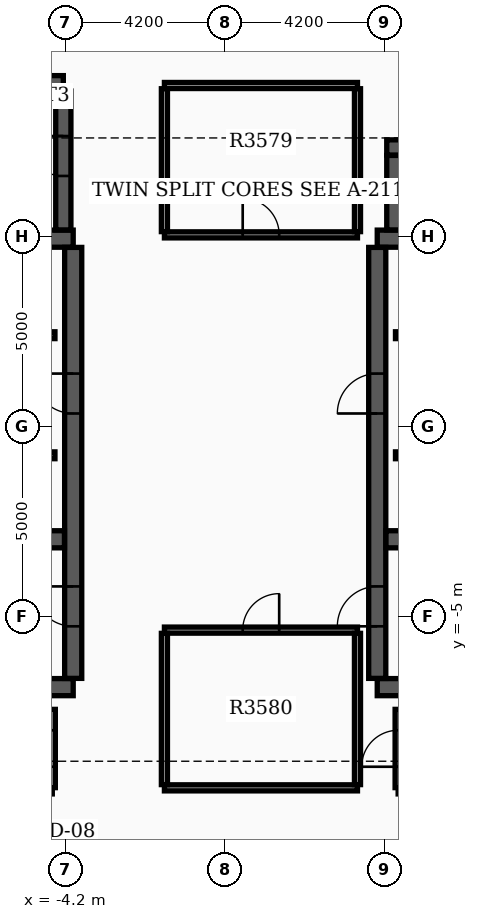
"""IFC4 building model, lengths in metres.
Left out: names, types, materials, properties, quantities, classifications, styles, units other than length and angle.
Written with IfcOpenShell. Run it as: python <this file> out.ifc"""

import sys

from ifc_helpers import new_model, si_unit, direction, frame, frame_2d, origin, place, context, subcontext, project, spatial, rectangle, extrude, element, fill, save


model = new_model("IFC4")
c1 = context("Model", 3, precision=1e-05, world=origin(), true_north=direction((0.0, 1.0)))
c2 = subcontext(c1, "Body", "Model", "MODEL_VIEW")
j1 = project(units=[si_unit("LENGTHUNIT", "METRE"), si_unit("PLANEANGLEUNIT", "RADIAN")], contexts=[c1])
p1 = place(None, origin())
s1 = spatial("IfcSite", under=j1, at=p1, CompositionType="ELEMENT")
p2 = place(p1, origin())
s2 = spatial("IfcBuilding", under=s1, at=p2, CompositionType="ELEMENT")
p3 = place(p2, frame((0.0, 0.0, 224.7)))
s3 = spatial("IfcBuildingStorey", under=s2, at=p3, CompositionType="ELEMENT", Elevation=224.7)
for number, where, z_axis, x_axis in (
    (1, (-12.4, -6.85, 0.0), (0.0, 0.0, 1.0), (1.0, 0.0, 0.0)),
    (2, (-12.4, 4.95, 0.0), (0.0, 0.0, 1.0), (1.0, 0.0, 0.0)),
):
    element("IfcWall", number, at=place(p3, frame(where, z_axis=z_axis, x_axis=x_axis)), inside=s3, PredefinedType="SHEAR", context=c2, shape_type="SweptSolid", body=[
        extrude(rectangle(XDim=8.4, YDim=0.45, at=frame_2d((4.2, 0.0))), origin(), (0.0, 0.0, 1.0), 3.7),
    ])
p4 = place(p3, frame((-4.0, -6.62, 0.0), z_axis=(0.0, 0.0, 1.0), x_axis=(0.0, 1.0, 0.0)))
e3 = element("IfcWall", 3, at=p4, inside=s3, PredefinedType="SHEAR", context=c2, shape_type="SweptSolid", body=[
    extrude(rectangle(XDim=11.34, YDim=0.45, at=frame_2d((5.67, 0.0))), origin(), (0.0, 0.0, 1.0), 3.7),
])
p5 = place(p4, frame((1.37, 0.0, 0.0)))
e4 = element("IfcOpeningElement", 4, at=p5, cuts=e3, PredefinedType="OPENING", context=c2, shape_type="SweptSolid", body=[
    extrude(rectangle(XDim=1.05, YDim=2.15, at=frame_2d((0.525, 1.075))), frame((0.0, 0.235, 0.0), z_axis=(0.0, -1.0, 0.0), x_axis=(1.0, 0.0, 0.0)), (0.0, 0.0, 1.0), 0.47),
])
p6 = place(p4, frame((6.97, 0.0, 0.0)))
e5 = element("IfcOpeningElement", 5, at=p6, cuts=e3, PredefinedType="OPENING", context=c2, shape_type="SweptSolid", body=[
    extrude(rectangle(XDim=1.05, YDim=2.15, at=frame_2d((0.525, 1.075))), frame((0.0, 0.235, 0.0), z_axis=(0.0, -1.0, 0.0), x_axis=(1.0, 0.0, 0.0)), (0.0, 0.0, 1.0), 0.47),
])
p7 = place(p3, frame((-12.17, -2.96, 0.0), z_axis=(0.0, 0.0, 1.0), x_axis=(1.0, 0.0, 0.0)))
e6 = element("IfcWall", 6, at=p7, inside=s3, PredefinedType="SHEAR", context=c2, shape_type="SweptSolid", body=[
    extrude(rectangle(XDim=7.94, YDim=0.45, at=frame_2d((3.97, 0.0))), origin(), (0.0, 0.0, 1.0), 3.7),
])
for number, where, z_axis, x_axis in (
    (7, (4.0, -6.85, 0.0), (0.0, 0.0, 1.0), (1.0, 0.0, 0.0)),
    (8, (4.0, 4.95, 0.0), (0.0, 0.0, 1.0), (1.0, 0.0, 0.0)),
):
    element("IfcWall", number, at=place(p3, frame(where, z_axis=z_axis, x_axis=x_axis)), inside=s3, PredefinedType="SHEAR", context=c2, shape_type="SweptSolid", body=[
        extrude(rectangle(XDim=8.4, YDim=0.45, at=frame_2d((4.2, 0.0))), origin(), (0.0, 0.0, 1.0), 3.7),
    ])
p8 = place(p3, frame((4.0, -6.62, 0.0), z_axis=(0.0, 0.0, 1.0), x_axis=(0.0, 1.0, 0.0)))
e9 = element("IfcWall", 9, at=p8, inside=s3, PredefinedType="SHEAR", context=c2, shape_type="SweptSolid", body=[
    extrude(rectangle(XDim=11.34, YDim=0.45, at=frame_2d((5.67, 0.0))), origin(), (0.0, 0.0, 1.0), 3.7),
])
p9 = place(p8, frame((1.37, 0.0, 0.0)))
e10 = element("IfcOpeningElement", 10, at=p9, cuts=e9, PredefinedType="OPENING", context=c2, shape_type="SweptSolid", body=[
    extrude(rectangle(XDim=1.05, YDim=2.15, at=frame_2d((0.525, 1.075))), frame((0.0, 0.235, 0.0), z_axis=(0.0, -1.0, 0.0), x_axis=(1.0, 0.0, 0.0)), (0.0, 0.0, 1.0), 0.47),
])
p10 = place(p8, frame((6.97, 0.0, 0.0)))
e11 = element("IfcOpeningElement", 11, at=p10, cuts=e9, PredefinedType="OPENING", context=c2, shape_type="SweptSolid", body=[
    extrude(rectangle(XDim=1.05, YDim=2.15, at=frame_2d((0.525, 1.075))), frame((0.0, 0.235, 0.0), z_axis=(0.0, -1.0, 0.0), x_axis=(1.0, 0.0, 0.0)), (0.0, 0.0, 1.0), 0.47),
])
p11 = place(p3, frame((4.23, -2.96, 0.0), z_axis=(0.0, 0.0, 1.0), x_axis=(1.0, 0.0, 0.0)))
e12 = element("IfcWall", 12, at=p11, inside=s3, PredefinedType="SHEAR", context=c2, shape_type="SweptSolid", body=[
    extrude(rectangle(XDim=7.94, YDim=0.45, at=frame_2d((3.97, 0.0))), origin(), (0.0, 0.0, 1.0), 3.7),
])
p12 = place(p3, frame((-12.22, 9.04, 0.0), z_axis=(0.0, 0.0, 1.0), x_axis=(1.0, 0.0, 0.0)))
e13 = element("IfcWall", 13, at=p12, inside=s3, PredefinedType="SHEAR", context=c2, shape_type="SweptSolid", body=[
    extrude(rectangle(XDim=7.96, YDim=0.4, at=frame_2d((3.98, 0.0))), origin(), (0.0, 0.0, 1.0), 3.7),
])
p13 = place(p3, frame((-4.26, 5.18, 0.0), z_axis=(0.0, 0.0, 1.0), x_axis=(0.0, 1.0, 0.0)))
e14 = element("IfcWall", 14, at=p13, inside=s3, PredefinedType="SHEAR", context=c2, shape_type="SweptSolid", body=[
    extrude(rectangle(XDim=3.655, YDim=0.4, at=frame_2d((1.828, 0.0))), origin(), (0.0, 0.0, 1.0), 3.7),
])
p14 = place(p13, frame((1.42, 0.0, 0.0)))
e15 = element("IfcOpeningElement", 15, at=p14, cuts=e14, PredefinedType="OPENING", context=c2, shape_type="SweptSolid", body=[
    extrude(rectangle(XDim=1.05, YDim=2.15, at=frame_2d((0.525, 1.075))), frame((0.0, 0.21, 0.0), z_axis=(0.0, -1.0, 0.0), x_axis=(1.0, 0.0, 0.0)), (0.0, 0.0, 1.0), 0.42),
])
p15 = place(p3, frame((4.45, 5.18, 0.0), z_axis=(0.0, 0.0, 1.0), x_axis=(0.0, 1.0, 0.0)))
e16 = element("IfcWall", 16, at=p15, inside=s3, PredefinedType="SHEAR", context=c2, shape_type="SweptSolid", body=[
    extrude(rectangle(XDim=1.96, YDim=0.4, at=frame_2d((0.98, 0.0))), origin(), (0.0, 0.0, 1.0), 3.7),
])
p16 = place(p3, frame((4.25, 7.35, 0.0), z_axis=(0.0, 0.0, 1.0), x_axis=(1.0, 0.0, 0.0)))
e17 = element("IfcWall", 17, at=p16, inside=s3, PredefinedType="SHEAR", context=c2, shape_type="SweptSolid", body=[
    extrude(rectangle(XDim=5.4, YDim=0.4, at=frame_2d((2.7, 0.0))), origin(), (0.0, 0.0, 1.0), 3.7),
])
p17 = place(p3, frame((-11.9, 2.41, 0.0), z_axis=(0.0, 0.0, 1.0), x_axis=(1.0, 0.0, 0.0)))
e18 = element("IfcWall", 18, at=p17, inside=s3, PredefinedType="SOLIDWALL", context=c2, shape_type="SweptSolid", body=[
    extrude(rectangle(XDim=7.42, YDim=0.18, at=frame_2d((3.71, 0.0))), origin(), (0.0, 0.0, 1.0), 3.17),
])
p18 = place(p17, frame((0.55, 0.0, 0.0)))
e19 = element("IfcOpeningElement", 19, at=p18, cuts=e18, PredefinedType="OPENING", context=c2, shape_type="SweptSolid", body=[
    extrude(rectangle(XDim=1.1, YDim=2.15, at=frame_2d((0.55, 1.075))), frame((0.0, 0.1, 0.0), z_axis=(0.0, -1.0, 0.0), x_axis=(1.0, 0.0, 0.0)), (0.0, 0.0, 1.0), 0.2),
])
p19 = place(p17, frame((4.9, 0.0, 0.0)))
e20 = element("IfcOpeningElement", 20, at=p19, cuts=e18, PredefinedType="OPENING", context=c2, shape_type="SweptSolid", body=[
    extrude(rectangle(XDim=0.88, YDim=2.1, at=frame_2d((0.44, 1.05))), frame((0.0, 0.1, 0.0), z_axis=(0.0, -1.0, 0.0), x_axis=(1.0, 0.0, 0.0)), (0.0, 0.0, 1.0), 0.2),
])
p20 = place(p3, frame((4.48, 2.41, 0.0), z_axis=(0.0, 0.0, 1.0), x_axis=(1.0, 0.0, 0.0)))
e21 = element("IfcWall", 21, at=p20, inside=s3, PredefinedType="SOLIDWALL", context=c2, shape_type="SweptSolid", body=[
    extrude(rectangle(XDim=7.42, YDim=0.18, at=frame_2d((3.71, 0.0))), origin(), (0.0, 0.0, 1.0), 3.17),
])
p21 = place(p20, frame((5.67, 0.0, 0.0)))
e22 = element("IfcOpeningElement", 22, at=p21, cuts=e21, PredefinedType="OPENING", context=c2, shape_type="SweptSolid", body=[
    extrude(rectangle(XDim=1.1, YDim=2.15, at=frame_2d((0.55, 1.075))), frame((0.0, 0.1, 0.0), z_axis=(0.0, -1.0, 0.0), x_axis=(1.0, 0.0, 0.0)), (0.0, 0.0, 1.0), 0.2),
])
p22 = place(p20, frame((1.6, 0.0, 0.0)))
e23 = element("IfcOpeningElement", 23, at=p22, cuts=e21, PredefinedType="OPENING", context=c2, shape_type="SweptSolid", body=[
    extrude(rectangle(XDim=0.88, YDim=2.1, at=frame_2d((0.44, 1.05))), frame((0.0, 0.1, 0.0), z_axis=(0.0, -1.0, 0.0), x_axis=(1.0, 0.0, 0.0)), (0.0, 0.0, 1.0), 0.2),
])
p23 = place(p3, frame((-11.9, -0.75, 0.0), z_axis=(0.0, 0.0, 1.0), x_axis=(1.0, 0.0, 0.0)))
e24 = element("IfcWall", 24, at=p23, inside=s3, PredefinedType="SOLIDWALL", context=c2, shape_type="SweptSolid", body=[
    extrude(rectangle(XDim=7.42, YDim=0.18, at=frame_2d((3.71, 0.0))), origin(), (0.0, 0.0, 1.0), 3.17),
])
p24 = place(p23, frame((5.75, 0.0, 0.0)))
e25 = element("IfcOpeningElement", 25, at=p24, cuts=e24, PredefinedType="OPENING", context=c2, shape_type="SweptSolid", body=[
    extrude(rectangle(XDim=1.1, YDim=2.15, at=frame_2d((0.55, 1.075))), frame((0.0, 0.1, 0.0), z_axis=(0.0, -1.0, 0.0), x_axis=(1.0, 0.0, 0.0)), (0.0, 0.0, 1.0), 0.2),
])
p25 = place(p23, frame((1.6, 0.0, 0.0)))
e26 = element("IfcOpeningElement", 26, at=p25, cuts=e24, PredefinedType="OPENING", context=c2, shape_type="SweptSolid", body=[
    extrude(rectangle(XDim=0.88, YDim=2.1, at=frame_2d((0.44, 1.05))), frame((0.0, 0.1, 0.0), z_axis=(0.0, -1.0, 0.0), x_axis=(1.0, 0.0, 0.0)), (0.0, 0.0, 1.0), 0.2),
])
p26 = place(p3, frame((4.48, -0.75, 0.0), z_axis=(0.0, 0.0, 1.0), x_axis=(1.0, 0.0, 0.0)))
e27 = element("IfcWall", 27, at=p26, inside=s3, PredefinedType="SOLIDWALL", context=c2, shape_type="SweptSolid", body=[
    extrude(rectangle(XDim=7.42, YDim=0.18, at=frame_2d((3.71, 0.0))), origin(), (0.0, 0.0, 1.0), 3.17),
])
p27 = place(p26, frame((3.92, 0.0, 0.0)))
e28 = element("IfcOpeningElement", 28, at=p27, cuts=e27, PredefinedType="OPENING", context=c2, shape_type="SweptSolid", body=[
    extrude(rectangle(XDim=1.1, YDim=2.15, at=frame_2d((0.55, 1.075))), frame((0.0, 0.1, 0.0), z_axis=(0.0, -1.0, 0.0), x_axis=(1.0, 0.0, 0.0)), (0.0, 0.0, 1.0), 0.2),
])
p28 = place(p26, frame((5.82, 0.0, 0.0)))
e29 = element("IfcOpeningElement", 29, at=p28, cuts=e27, PredefinedType="OPENING", context=c2, shape_type="SweptSolid", body=[
    extrude(rectangle(XDim=1.1, YDim=2.15, at=frame_2d((0.55, 1.075))), frame((0.0, 0.1, 0.0), z_axis=(0.0, -1.0, 0.0), x_axis=(1.0, 0.0, 0.0)), (0.0, 0.0, 1.0), 0.2),
])
p29 = place(p26, frame((1.6, 0.0, 0.0)))
e30 = element("IfcOpeningElement", 30, at=p29, cuts=e27, PredefinedType="OPENING", context=c2, shape_type="SweptSolid", body=[
    extrude(rectangle(XDim=0.88, YDim=2.1, at=frame_2d((0.44, 1.05))), frame((0.0, 0.1, 0.0), z_axis=(0.0, -1.0, 0.0), x_axis=(1.0, 0.0, 0.0)), (0.0, 0.0, 1.0), 0.2),
])
p30 = place(p3, frame((-1.6, 5.05, 0.0), z_axis=(0.0, 0.0, 1.0), x_axis=(1.0, 0.0, 0.0)))
e31 = element("IfcWall", 31, at=p30, inside=s3, PredefinedType="PARTITIONING", context=c2, shape_type="SweptSolid", body=[
    extrude(rectangle(XDim=5.08, YDim=0.16, at=frame_2d((2.54, 0.0))), origin(), (0.0, 0.0, 1.0), 3.17),
])
p31 = place(p30, frame((2.06, 0.0, 0.0)))
e32 = element("IfcOpeningElement", 32, at=p31, cuts=e31, PredefinedType="OPENING", context=c2, shape_type="SweptSolid", body=[
    extrude(rectangle(XDim=0.96, YDim=2.15, at=frame_2d((0.48, 1.075))), frame((0.0, 0.09, 0.0), z_axis=(0.0, -1.0, 0.0), x_axis=(1.0, 0.0, 0.0)), (0.0, 0.0, 1.0), 0.18),
])
p32 = place(p3, frame((-1.6, 8.98, 0.0), z_axis=(0.0, 0.0, 1.0), x_axis=(1.0, 0.0, 0.0)))
e33 = element("IfcWall", 33, at=p32, inside=s3, PredefinedType="PARTITIONING", context=c2, shape_type="SweptSolid", body=[
    extrude(rectangle(XDim=5.08, YDim=0.16, at=frame_2d((2.54, 0.0))), origin(), (0.0, 0.0, 1.0), 3.17),
])
for number, where, z_axis, x_axis in (
    (34, (-1.6, 5.135, 0.0), (0.0, 0.0, 1.0), (0.0, 1.0, 0.0)),
    (35, (3.48, 5.135, 0.0), (0.0, 0.0, 1.0), (0.0, 1.0, 0.0)),
):
    element("IfcWall", number, at=place(p3, frame(where, z_axis=z_axis, x_axis=x_axis)), inside=s3, PredefinedType="PARTITIONING", context=c2, shape_type="SweptSolid", body=[
        extrude(rectangle(XDim=3.76, YDim=0.16, at=frame_2d((1.88, 0.0))), origin(), (0.0, 0.0, 1.0), 3.17),
    ])
p33 = place(p3, frame((-1.6, -9.5, 0.0), z_axis=(0.0, 0.0, 1.0), x_axis=(1.0, 0.0, 0.0)))
e36 = element("IfcWall", 36, at=p33, inside=s3, PredefinedType="PARTITIONING", context=c2, shape_type="SweptSolid", body=[
    extrude(rectangle(XDim=5.08, YDim=0.16, at=frame_2d((2.54, 0.0))), origin(), (0.0, 0.0, 1.0), 3.17),
])
p34 = place(p3, frame((-1.6, -5.35, 0.0), z_axis=(0.0, 0.0, 1.0), x_axis=(1.0, 0.0, 0.0)))
e37 = element("IfcWall", 37, at=p34, inside=s3, PredefinedType="PARTITIONING", context=c2, shape_type="SweptSolid", body=[
    extrude(rectangle(XDim=5.08, YDim=0.16, at=frame_2d((2.54, 0.0))), origin(), (0.0, 0.0, 1.0), 3.17),
])
p35 = place(p34, frame((2.06, 0.0, 0.0)))
e38 = element("IfcOpeningElement", 38, at=p35, cuts=e37, PredefinedType="OPENING", context=c2, shape_type="SweptSolid", body=[
    extrude(rectangle(XDim=0.96, YDim=2.15, at=frame_2d((0.48, 1.075))), frame((0.0, 0.09, 0.0), z_axis=(0.0, -1.0, 0.0), x_axis=(1.0, 0.0, 0.0)), (0.0, 0.0, 1.0), 0.18),
])
for number, where, z_axis, x_axis in (
    (39, (-1.6, -9.415, 0.0), (0.0, 0.0, 1.0), (0.0, 1.0, 0.0)),
    (40, (3.48, -9.415, 0.0), (0.0, 0.0, 1.0), (0.0, 1.0, 0.0)),
):
    element("IfcWall", number, at=place(p3, frame(where, z_axis=z_axis, x_axis=x_axis)), inside=s3, PredefinedType="PARTITIONING", context=c2, shape_type="SweptSolid", body=[
        extrude(rectangle(XDim=3.98, YDim=0.16, at=frame_2d((1.99, 0.0))), origin(), (0.0, 0.0, 1.0), 3.17),
    ])
p36 = place(p3, frame((4.55, -9.58, 0.0), z_axis=(0.0, 0.0, 1.0), x_axis=(1.0, 0.0, 0.0)))
e41 = element("IfcWall", 41, at=p36, inside=s3, PredefinedType="PARTITIONING", context=c2, shape_type="SweptSolid", body=[
    extrude(rectangle(XDim=8.1, YDim=0.16, at=frame_2d((4.05, 0.0))), origin(), (0.0, 0.0, 1.0), 3.17),
])
p37 = place(p3, frame((4.55, -9.495, 0.0), z_axis=(0.0, 0.0, 1.0), x_axis=(0.0, 1.0, 0.0)))
e42 = element("IfcWall", 42, at=p37, inside=s3, PredefinedType="PARTITIONING", context=c2, shape_type="SweptSolid", body=[
    extrude(rectangle(XDim=2.06, YDim=0.16, at=frame_2d((1.03, 0.0))), origin(), (0.0, 0.0, 1.0), 3.17),
])
p38 = place(p37, frame((0.55, 0.0, 0.0)))
e43 = element("IfcOpeningElement", 43, at=p38, cuts=e42, PredefinedType="OPENING", context=c2, shape_type="SweptSolid", body=[
    extrude(rectangle(XDim=0.96, YDim=2.15, at=frame_2d((0.48, 1.075))), frame((0.0, 0.09, 0.0), z_axis=(0.0, -1.0, 0.0), x_axis=(1.0, 0.0, 0.0)), (0.0, 0.0, 1.0), 0.18),
])
p39 = place(p3, frame((-4.55, -9.495, 0.0), z_axis=(0.0, 0.0, 1.0), x_axis=(0.0, 1.0, 0.0)))
e44 = element("IfcWall", 44, at=p39, inside=s3, PredefinedType="PARTITIONING", context=c2, shape_type="SweptSolid", body=[
    extrude(rectangle(XDim=2.06, YDim=0.16, at=frame_2d((1.03, 0.0))), origin(), (0.0, 0.0, 1.0), 3.17),
])
p40 = place(p39, frame((0.55, 0.0, 0.0)))
e45 = element("IfcOpeningElement", 45, at=p40, cuts=e44, PredefinedType="OPENING", context=c2, shape_type="SweptSolid", body=[
    extrude(rectangle(XDim=0.96, YDim=2.15, at=frame_2d((0.48, 1.075))), frame((0.0, 0.09, 0.0), z_axis=(0.0, -1.0, 0.0), x_axis=(1.0, 0.0, 0.0)), (0.0, 0.0, 1.0), 0.18),
])
p41 = place(p5, origin())
e46 = element("IfcDoor", 46, at=p41, inside=s3, OperationType="SINGLE_SWING_RIGHT", PredefinedType="DOOR", context=c2, shape_type="SweptSolid", body=[
    extrude(rectangle(XDim=1.05, YDim=2.15, at=frame_2d((0.525, 1.075))), frame((0.0, 0.025, 0.0), z_axis=(0.0, -1.0, 0.0), x_axis=(1.0, 0.0, 0.0)), (0.0, 0.0, 1.0), 0.05),
])
fill(e4, e46)
p42 = place(p9, origin())
e47 = element("IfcDoor", 47, at=p42, inside=s3, OperationType="SINGLE_SWING_LEFT", PredefinedType="DOOR", context=c2, shape_type="SweptSolid", body=[
    extrude(rectangle(XDim=1.05, YDim=2.15, at=frame_2d((0.525, 1.075))), frame((0.0, 0.025, 0.0), z_axis=(0.0, -1.0, 0.0), x_axis=(1.0, 0.0, 0.0)), (0.0, 0.0, 1.0), 0.05),
])
fill(e10, e47)
p43 = place(p6, origin())
e48 = element("IfcDoor", 48, at=p43, inside=s3, OperationType="SINGLE_SWING_RIGHT", PredefinedType="DOOR", context=c2, shape_type="SweptSolid", body=[
    extrude(rectangle(XDim=1.05, YDim=2.15, at=frame_2d((0.525, 1.075))), frame((0.0, 0.025, 0.0), z_axis=(0.0, -1.0, 0.0), x_axis=(1.0, 0.0, 0.0)), (0.0, 0.0, 1.0), 0.05),
])
fill(e5, e48)
p44 = place(p10, origin())
e49 = element("IfcDoor", 49, at=p44, inside=s3, OperationType="SINGLE_SWING_LEFT", PredefinedType="DOOR", context=c2, shape_type="SweptSolid", body=[
    extrude(rectangle(XDim=1.05, YDim=2.15, at=frame_2d((0.525, 1.075))), frame((0.0, 0.025, 0.0), z_axis=(0.0, -1.0, 0.0), x_axis=(1.0, 0.0, 0.0)), (0.0, 0.0, 1.0), 0.05),
])
fill(e11, e49)
p45 = place(p14, origin())
e50 = element("IfcDoor", 50, at=p45, inside=s3, OperationType="SINGLE_SWING_RIGHT", PredefinedType="DOOR", context=c2, shape_type="SweptSolid", body=[
    extrude(rectangle(XDim=1.05, YDim=2.15, at=frame_2d((0.525, 1.075))), frame((0.0, 0.025, 0.0), z_axis=(0.0, -1.0, 0.0), x_axis=(1.0, 0.0, 0.0)), (0.0, 0.0, 1.0), 0.05),
])
fill(e15, e50)
p46 = place(p31, origin())
e51 = element("IfcDoor", 51, at=p46, inside=s3, OperationType="SINGLE_SWING_LEFT", PredefinedType="DOOR", context=c2, shape_type="SweptSolid", body=[
    extrude(rectangle(XDim=0.96, YDim=2.15, at=frame_2d((0.48, 1.075))), frame((0.0, 0.025, 0.0), z_axis=(0.0, -1.0, 0.0), x_axis=(1.0, 0.0, 0.0)), (0.0, 0.0, 1.0), 0.05),
])
fill(e32, e51)
p47 = place(p35, origin())
e52 = element("IfcDoor", 52, at=p47, inside=s3, OperationType="SINGLE_SWING_RIGHT", PredefinedType="DOOR", context=c2, shape_type="SweptSolid", body=[
    extrude(rectangle(XDim=0.96, YDim=2.15, at=frame_2d((0.48, 1.075))), frame((0.0, 0.025, 0.0), z_axis=(0.0, -1.0, 0.0), x_axis=(1.0, 0.0, 0.0)), (0.0, 0.0, 1.0), 0.05),
])
fill(e38, e52)
p48 = place(p38, origin())
e53 = element("IfcDoor", 53, at=p48, inside=s3, OperationType="SINGLE_SWING_LEFT", PredefinedType="DOOR", context=c2, shape_type="SweptSolid", body=[
    extrude(rectangle(XDim=0.96, YDim=2.15, at=frame_2d((0.48, 1.075))), frame((0.0, 0.025, 0.0), z_axis=(0.0, -1.0, 0.0), x_axis=(1.0, 0.0, 0.0)), (0.0, 0.0, 1.0), 0.05),
])
fill(e43, e53)
p49 = place(p40, origin())
e54 = element("IfcDoor", 54, at=p49, inside=s3, OperationType="SINGLE_SWING_RIGHT", PredefinedType="DOOR", context=c2, shape_type="SweptSolid", body=[
    extrude(rectangle(XDim=0.96, YDim=2.15, at=frame_2d((0.48, 1.075))), frame((0.0, 0.025, 0.0), z_axis=(0.0, -1.0, 0.0), x_axis=(1.0, 0.0, 0.0)), (0.0, 0.0, 1.0), 0.05),
])
fill(e45, e54)
save(model, sys.argv[1])
